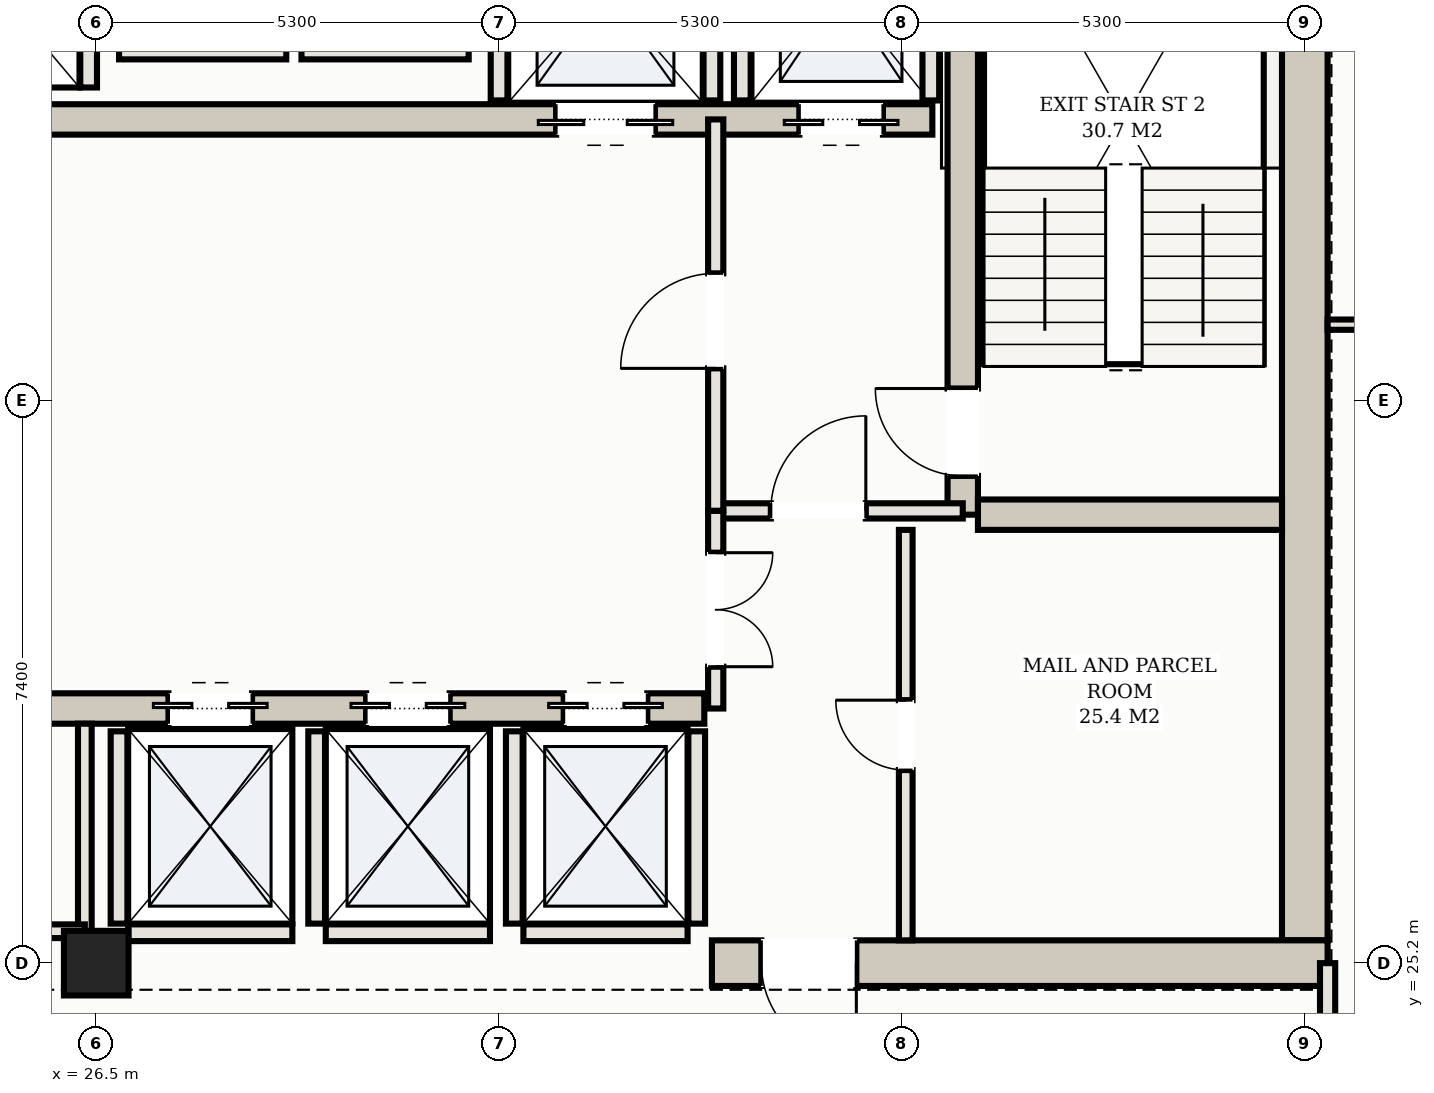
"""IFC4 building model, lengths in metres.
Left out: names, types, materials, properties, quantities, classifications, styles, units other than length and angle.
Written with IfcOpenShell. Run it as: python <this file> out.ifc"""

import sys

from ifc_helpers import new_model, si_unit, direction, frame, frame_2d, origin, origin_2d, place, context, subcontext, project, spatial, rectangle, hollow_rectangle, extrude, element, fill, save


model = new_model("IFC4")
c1 = context("Model", 3, precision=1e-05, world=origin(), true_north=direction((0.0, 1.0)))
c2 = subcontext(c1, "Body", "Model", "MODEL_VIEW")
j1 = project(units=[si_unit("LENGTHUNIT", "METRE"), si_unit("PLANEANGLEUNIT", "RADIAN")], contexts=[c1])
p1 = place(None, origin())
s1 = spatial("IfcSite", under=j1, at=p1, CompositionType="ELEMENT")
p2 = place(p1, origin())
s2 = spatial("IfcBuilding", under=s1, at=p2, CompositionType="ELEMENT")
p3 = place(p2, frame((0.0, 0.0, 175.5)))
s3 = spatial("IfcBuildingStorey", under=s2, at=p3, CompositionType="ELEMENT", Elevation=175.5)
p4 = place(p3, frame((42.4, 25.5, 0.0), z_axis=(0.0, 0.0, 1.0), x_axis=(0.0, 1.0, 0.0)))
e1 = element("IfcWall", 1, at=p4, inside=s3, PredefinedType="SHEAR", context=c2, shape_type="SweptSolid", body=[
    extrude(rectangle(XDim=14.2, YDim=0.6, at=frame_2d((7.1, 0.0))), origin(), (0.0, 0.0, 1.0), 3.1),
])
p5 = place(p3, frame((34.6, 25.2, 0.0), z_axis=(0.0, 0.0, 1.0), x_axis=(1.0, 0.0, 0.0)))
e2 = element("IfcWall", 2, at=p5, inside=s3, PredefinedType="SHEAR", context=c2, shape_type="SweptSolid", body=[
    extrude(rectangle(XDim=8.1, YDim=0.6, at=frame_2d((4.05, 0.0))), origin(), (0.0, 0.0, 1.0), 3.1),
])
p6 = place(p5, frame((0.65, 0.0, 0.0)))
e3 = element("IfcOpeningElement", 3, at=p6, cuts=e2, PredefinedType="OPENING", context=c2, shape_type="SweptSolid", body=[
    extrude(rectangle(XDim=1.25, YDim=2.2, at=frame_2d((0.625, 1.1))), frame((0.0, 0.31, 0.0), z_axis=(0.0, -1.0, 0.0), x_axis=(1.0, 0.0, 0.0)), (0.0, 0.0, 1.0), 0.62),
])
p7 = place(p3, frame((37.9, 31.1, 0.0), z_axis=(0.0, 0.0, 1.0), x_axis=(0.0, 1.0, 0.0)))
e4 = element("IfcWall", 4, at=p7, inside=s3, PredefinedType="SHEAR", context=c2, shape_type="SweptSolid", body=[
    extrude(rectangle(XDim=8.6, YDim=0.4, at=frame_2d((4.3, 0.0))), origin(), (0.0, 0.0, 1.0), 3.1),
])
p8 = place(p7, frame((0.51, 0.0, 0.0)))
e5 = element("IfcOpeningElement", 5, at=p8, cuts=e4, PredefinedType="OPENING", context=c2, shape_type="SweptSolid", body=[
    extrude(rectangle(XDim=1.15, YDim=2.2, at=frame_2d((0.575, 1.1))), frame((0.0, 0.21, 0.0), z_axis=(0.0, -1.0, 0.0), x_axis=(1.0, 0.0, 0.0)), (0.0, 0.0, 1.0), 0.42),
])
p9 = place(p3, frame((38.1, 31.1, 0.0), z_axis=(0.0, 0.0, 1.0), x_axis=(1.0, 0.0, 0.0)))
e6 = element("IfcWall", 6, at=p9, inside=s3, PredefinedType="SHEAR", context=c2, shape_type="SweptSolid", body=[
    extrude(rectangle(XDim=4.0, YDim=0.4, at=frame_2d((2.0, 0.0))), origin(), (0.0, 0.0, 1.0), 3.1),
])
p10 = place(p3, frame((15.5, 36.3, 0.0), z_axis=(0.0, 0.0, 1.0), x_axis=(1.0, 0.0, 0.0)))
e7 = element("IfcWall", 7, at=p10, inside=s3, PredefinedType="SHEAR", context=c2, shape_type="SweptSolid", body=[
    extrude(rectangle(XDim=22.0, YDim=0.4, at=frame_2d((11.0, 0.0))), origin(), (0.0, 0.0, 1.0), 3.1),
])
p11 = place(p10, frame((0.65, 0.0, 0.0)))
e8 = element("IfcOpeningElement", 8, at=p11, cuts=e7, PredefinedType="OPENING", context=c2, shape_type="SweptSolid", body=[
    extrude(rectangle(XDim=1.1, YDim=2.15, at=frame_2d((0.55, 1.075))), frame((0.0, 0.21, 0.0), z_axis=(0.0, -1.0, 0.0), x_axis=(1.0, 0.0, 0.0)), (0.0, 0.0, 1.0), 0.42),
])
p12 = place(p10, frame((20.25, 0.0, 0.0)))
e9 = element("IfcOpeningElement", 9, at=p12, cuts=e7, PredefinedType="OPENING", context=c2, shape_type="SweptSolid", body=[
    extrude(rectangle(XDim=1.1, YDim=2.15, at=frame_2d((0.55, 1.075))), frame((0.0, 0.21, 0.0), z_axis=(0.0, -1.0, 0.0), x_axis=(1.0, 0.0, 0.0)), (0.0, 0.0, 1.0), 0.42),
])
p13 = place(p10, frame((17.05, 0.0, 0.0)))
e10 = element("IfcOpeningElement", 10, at=p13, cuts=e7, PredefinedType="OPENING", context=c2, shape_type="SweptSolid", body=[
    extrude(rectangle(XDim=1.3, YDim=2.2, at=frame_2d((0.65, 1.1))), frame((0.0, 0.21, 0.0), z_axis=(0.0, -1.0, 0.0), x_axis=(1.0, 0.0, 0.0)), (0.0, 0.0, 1.0), 0.42),
])
p14 = place(p3, frame((18.5, 28.55, 0.0), z_axis=(0.0, 0.0, 1.0), x_axis=(1.0, 0.0, 0.0)))
e11 = element("IfcWall", 11, at=p14, inside=s3, PredefinedType="SHEAR", context=c2, shape_type="SweptSolid", body=[
    extrude(rectangle(XDim=16.0, YDim=0.4, at=frame_2d((8.0, 0.0))), origin(), (0.0, 0.0, 1.0), 3.1),
])
p15 = place(p14, frame((8.95, 0.0, 0.0)))
e12 = element("IfcOpeningElement", 12, at=p15, cuts=e11, PredefinedType="OPENING", context=c2, shape_type="SweptSolid", body=[
    extrude(rectangle(XDim=1.1, YDim=2.15, at=frame_2d((0.55, 1.075))), frame((0.0, 0.21, 0.0), z_axis=(0.0, -1.0, 0.0), x_axis=(1.0, 0.0, 0.0)), (0.0, 0.0, 1.0), 0.42),
])
p16 = place(p14, frame((11.55, 0.0, 0.0)))
e13 = element("IfcOpeningElement", 13, at=p16, cuts=e11, PredefinedType="OPENING", context=c2, shape_type="SweptSolid", body=[
    extrude(rectangle(XDim=1.1, YDim=2.15, at=frame_2d((0.55, 1.075))), frame((0.0, 0.21, 0.0), z_axis=(0.0, -1.0, 0.0), x_axis=(1.0, 0.0, 0.0)), (0.0, 0.0, 1.0), 0.42),
])
p17 = place(p14, frame((14.15, 0.0, 0.0)))
e14 = element("IfcOpeningElement", 14, at=p17, cuts=e11, PredefinedType="OPENING", context=c2, shape_type="SweptSolid", body=[
    extrude(rectangle(XDim=1.1, YDim=2.15, at=frame_2d((0.55, 1.075))), frame((0.0, 0.21, 0.0), z_axis=(0.0, -1.0, 0.0), x_axis=(1.0, 0.0, 0.0)), (0.0, 0.0, 1.0), 0.42),
])
p18 = place(p3, frame((26.5, 25.2, 0.0), z_axis=(0.0, 0.0, 1.0), x_axis=(1.0, 0.0, 0.0)))
e15 = element("IfcColumn", 15, at=p18, inside=s3, PredefinedType="COLUMN", context=c2, shape_type="SweptSolid", body=[
    extrude(hollow_rectangle(XDim=0.85, YDim=0.85, WallThickness=0.028, at=origin_2d()), origin(), (0.0, 0.0, 1.0), 3.3),
])
for number, where, z_axis, x_axis in (
    (16, (35.0, 36.55, 0.0), (0.0, 0.0, 1.0), (0.0, 1.0, 0.0)),
    (17, (37.48, 36.55, 0.0), (0.0, 0.0, 1.0), (0.0, 1.0, 0.0)),
    (18, (31.8, 36.55, 0.0), (0.0, 0.0, 1.0), (0.0, 1.0, 0.0)),
    (19, (34.6, 36.55, 0.0), (0.0, 0.0, 1.0), (0.0, 1.0, 0.0)),
):
    element("IfcWall", number, at=place(p3, frame(where, z_axis=z_axis, x_axis=x_axis)), inside=s3, PredefinedType="SOLIDWALL", context=c2, shape_type="SweptSolid", body=[
        extrude(rectangle(XDim=2.93, YDim=0.22, at=frame_2d((1.465, 0.0))), origin(), (0.0, 0.0, 1.0), 3.1),
    ])
p19 = place(p3, frame((26.8, 25.72, 0.0), z_axis=(0.0, 0.0, 1.0), x_axis=(0.0, 1.0, 0.0)))
e20 = element("IfcWall", 20, at=p19, inside=s3, PredefinedType="SOLIDWALL", context=c2, shape_type="SweptSolid", body=[
    extrude(rectangle(XDim=2.53, YDim=0.22, at=frame_2d((1.265, 0.0))), origin(), (0.0, 0.0, 1.0), 3.1),
])
p20 = place(p3, frame((26.92, 25.6, 0.0), z_axis=(0.0, 0.0, 1.0), x_axis=(1.0, 0.0, 0.0)))
e21 = element("IfcWall", 21, at=p20, inside=s3, PredefinedType="SOLIDWALL", context=c2, shape_type="SweptSolid", body=[
    extrude(rectangle(XDim=2.16, YDim=0.22, at=frame_2d((1.08, 0.0))), origin(), (0.0, 0.0, 1.0), 2.295),
])
p21 = place(p3, frame((29.4, 25.72, 0.0), z_axis=(0.0, 0.0, 1.0), x_axis=(0.0, 1.0, 0.0)))
e22 = element("IfcWall", 22, at=p21, inside=s3, PredefinedType="SOLIDWALL", context=c2, shape_type="SweptSolid", body=[
    extrude(rectangle(XDim=2.53, YDim=0.22, at=frame_2d((1.265, 0.0))), origin(), (0.0, 0.0, 1.0), 3.1),
])
p22 = place(p3, frame((29.52, 25.6, 0.0), z_axis=(0.0, 0.0, 1.0), x_axis=(1.0, 0.0, 0.0)))
e23 = element("IfcWall", 23, at=p22, inside=s3, PredefinedType="SOLIDWALL", context=c2, shape_type="SweptSolid", body=[
    extrude(rectangle(XDim=2.16, YDim=0.22, at=frame_2d((1.08, 0.0))), origin(), (0.0, 0.0, 1.0), 2.295),
])
for number, where, z_axis, x_axis in (
    (24, (32.0, 25.72, 0.0), (0.0, 0.0, 1.0), (0.0, 1.0, 0.0)),
    (25, (34.4, 25.72, 0.0), (0.0, 0.0, 1.0), (0.0, 1.0, 0.0)),
):
    element("IfcWall", number, at=place(p3, frame(where, z_axis=z_axis, x_axis=x_axis)), inside=s3, PredefinedType="SOLIDWALL", context=c2, shape_type="SweptSolid", body=[
        extrude(rectangle(XDim=2.53, YDim=0.22, at=frame_2d((1.265, 0.0))), origin(), (0.0, 0.0, 1.0), 3.1),
    ])
p23 = place(p3, frame((32.12, 25.6, 0.0), z_axis=(0.0, 0.0, 1.0), x_axis=(1.0, 0.0, 0.0)))
e26 = element("IfcWall", 26, at=p23, inside=s3, PredefinedType="SOLIDWALL", context=c2, shape_type="SweptSolid", body=[
    extrude(rectangle(XDim=2.16, YDim=0.22, at=frame_2d((1.08, 0.0))), origin(), (0.0, 0.0, 1.0), 2.295),
])
p24 = place(p3, frame((26.4, 36.72, 0.0), z_axis=(0.0, 0.0, 1.0), x_axis=(0.0, 1.0, 0.0)))
e27 = element("IfcWall", 27, at=p24, inside=s3, PredefinedType="SOLIDWALL", context=c2, shape_type="SweptSolid", body=[
    extrude(rectangle(XDim=2.56, YDim=0.22, at=frame_2d((1.28, 0.0))), origin(), (0.0, 0.0, 1.0), 3.1),
])
for number, where, z_axis, x_axis in (
    (28, (26.8, 37.2, 0.0), (0.0, 0.0, 1.0), (1.0, 0.0, 0.0)),
    (29, (29.2, 37.2, 0.0), (0.0, 0.0, 1.0), (1.0, 0.0, 0.0)),
):
    element("IfcWall", number, at=place(p3, frame(where, z_axis=z_axis, x_axis=x_axis)), inside=s3, PredefinedType="SOLIDWALL", context=c2, shape_type="SweptSolid", body=[
        extrude(rectangle(XDim=2.2, YDim=0.22, at=frame_2d((1.1, 0.0))), origin(), (0.0, 0.0, 1.0), 3.1),
    ])
p25 = place(p3, frame((34.65, 31.15, 0.0), z_axis=(0.0, 0.0, 1.0), x_axis=(1.0, 0.0, 0.0)))
e30 = element("IfcWall", 30, at=p25, inside=s3, PredefinedType="PARTITIONING", context=c2, shape_type="SweptSolid", body=[
    extrude(rectangle(XDim=3.25, YDim=0.2, at=frame_2d((1.625, 0.0))), origin(), (0.0, 0.0, 1.0), 2.38),
])
p26 = place(p25, frame((0.725, 0.0, 0.0)))
e31 = element("IfcOpeningElement", 31, at=p26, cuts=e30, PredefinedType="OPENING", context=c2, shape_type="SweptSolid", body=[
    extrude(rectangle(XDim=1.25, YDim=2.2, at=frame_2d((0.625, 1.1))), frame((0.0, 0.11, 0.0), z_axis=(0.0, -1.0, 0.0), x_axis=(1.0, 0.0, 0.0)), (0.0, 0.0, 1.0), 0.22),
])
p27 = place(p3, frame((34.65, 31.15, 0.0), z_axis=(0.0, 0.0, 1.0), x_axis=(0.0, 1.0, 0.0)))
e32 = element("IfcWall", 32, at=p27, inside=s3, PredefinedType="PARTITIONING", context=c2, shape_type="SweptSolid", body=[
    extrude(rectangle(XDim=5.15, YDim=0.2, at=frame_2d((2.575, 0.0))), origin(), (0.0, 0.0, 1.0), 2.38),
])
p28 = place(p27, frame((1.875, 0.0, 0.0)))
e33 = element("IfcOpeningElement", 33, at=p28, cuts=e32, PredefinedType="OPENING", context=c2, shape_type="SweptSolid", body=[
    extrude(rectangle(XDim=1.25, YDim=2.2, at=frame_2d((0.625, 1.1))), frame((0.0, 0.11, 0.0), z_axis=(0.0, -1.0, 0.0), x_axis=(1.0, 0.0, 0.0)), (0.0, 0.0, 1.0), 0.22),
])
p29 = place(p3, frame((37.15, 25.5, 0.0), z_axis=(0.0, 0.0, 1.0), x_axis=(0.0, 1.0, 0.0)))
e34 = element("IfcWall", 34, at=p29, inside=s3, PredefinedType="PARTITIONING", context=c2, shape_type="SweptSolid", body=[
    extrude(rectangle(XDim=5.4, YDim=0.18, at=frame_2d((2.7, 0.0))), origin(), (0.0, 0.0, 1.0), 2.38),
])
p30 = place(p29, frame((2.24, 0.0, 0.0)))
e35 = element("IfcOpeningElement", 35, at=p30, cuts=e34, PredefinedType="OPENING", context=c2, shape_type="SweptSolid", body=[
    extrude(rectangle(XDim=0.92, YDim=2.15, at=frame_2d((0.46, 1.075))), frame((0.0, 0.1, 0.0), z_axis=(0.0, -1.0, 0.0), x_axis=(1.0, 0.0, 0.0)), (0.0, 0.0, 1.0), 0.2),
])
p31 = place(p3, frame((34.65, 28.55, 0.0), z_axis=(0.0, 0.0, 1.0), x_axis=(0.0, 1.0, 0.0)))
e36 = element("IfcWall", 36, at=p31, inside=s3, PredefinedType="PARTITIONING", context=c2, shape_type="SweptSolid", body=[
    extrude(rectangle(XDim=2.6, YDim=0.2, at=frame_2d((1.3, 0.0))), origin(), (0.0, 0.0, 1.0), 2.38),
])
p32 = place(p31, frame((0.55, 0.0, 0.0)))
e37 = element("IfcOpeningElement", 37, at=p32, cuts=e36, PredefinedType="OPENING", context=c2, shape_type="SweptSolid", body=[
    extrude(rectangle(XDim=1.5, YDim=2.25, at=frame_2d((0.75, 1.125))), frame((0.0, 0.11, 0.0), z_axis=(0.0, -1.0, 0.0), x_axis=(1.0, 0.0, 0.0)), (0.0, 0.0, 1.0), 0.22),
])
p33 = place(p3, frame((26.35, 25.62, 0.0), z_axis=(0.0, 0.0, 1.0), x_axis=(0.0, 1.0, 0.0)))
e38 = element("IfcWall", 38, at=p33, inside=s3, PredefinedType="PARTITIONING", context=c2, shape_type="SweptSolid", body=[
    extrude(rectangle(XDim=2.73, YDim=0.18, at=frame_2d((1.365, 0.0))), origin(), (0.0, 0.0, 1.0), 2.38),
])
p34 = place(p3, frame((18.45, 25.62, 0.0), z_axis=(0.0, 0.0, 1.0), x_axis=(1.0, 0.0, 0.0)))
e39 = element("IfcWall", 39, at=p34, inside=s3, PredefinedType="PARTITIONING", context=c2, shape_type="SweptSolid", body=[
    extrude(rectangle(XDim=7.9, YDim=0.18, at=frame_2d((3.95, 0.0))), origin(), (0.0, 0.0, 1.0), 2.38),
])
p35 = place(p34, frame((3.34, 0.0, 0.0)))
e40 = element("IfcOpeningElement", 40, at=p35, cuts=e39, PredefinedType="OPENING", context=c2, shape_type="SweptSolid", body=[
    extrude(rectangle(XDim=0.92, YDim=2.15, at=frame_2d((0.46, 1.075))), frame((0.0, 0.1, 0.0), z_axis=(0.0, -1.0, 0.0), x_axis=(1.0, 0.0, 0.0)), (0.0, 0.0, 1.0), 0.2),
])
p36 = place(p3, frame((42.7, 23.3, 0.0), z_axis=(0.0, 0.0, 1.0), x_axis=(0.0, 1.0, 0.0)))
e41 = element("IfcWall", 41, at=p36, inside=s3, PredefinedType="PARTITIONING", context=c2, shape_type="SweptSolid", body=[
    extrude(rectangle(XDim=1.9, YDim=0.2, at=frame_2d((0.95, 0.0))), origin(), (0.0, 0.0, 1.0), 2.38),
])
p37 = place(p3, frame((42.7, 33.6, 0.0), z_axis=(0.0, 0.0, 1.0), x_axis=(1.0, 0.0, 0.0)))
e42 = element("IfcWall", 42, at=p37, inside=s3, PredefinedType="PARTITIONING", context=c2, shape_type="SweptSolid", body=[
    extrude(rectangle(XDim=5.98, YDim=0.135, at=frame_2d((2.99, 0.0))), origin(), (0.0, 0.0, 1.0), 2.38),
])
p38 = place(p37, frame((2.53, 0.0, 0.0)))
e43 = element("IfcOpeningElement", 43, at=p38, cuts=e42, PredefinedType="OPENING", context=c2, shape_type="SweptSolid", body=[
    extrude(rectangle(XDim=0.92, YDim=2.15, at=frame_2d((0.46, 1.075))), frame((0.0, 0.078, 0.0), z_axis=(0.0, -1.0, 0.0), x_axis=(1.0, 0.0, 0.0)), (0.0, 0.0, 1.0), 0.155),
])
p39 = place(p12, frame((1.1, 0.0, 0.0), z_axis=(0.0, 0.0, 1.0), x_axis=(-1.0, 0.0, 0.0)))
e44 = element("IfcDoor", 44, at=p39, inside=s3, OperationType="DOUBLE_DOOR_SLIDING", PredefinedType="DOOR", context=c2, shape_type="SweptSolid", body=[
    extrude(rectangle(XDim=1.1, YDim=2.15, at=frame_2d((0.55, 1.075))), frame((0.0, 0.025, 0.0), z_axis=(0.0, -1.0, 0.0), x_axis=(1.0, 0.0, 0.0)), (0.0, 0.0, 1.0), 0.05),
])
fill(e9, e44)
p40 = place(p13, frame((1.3, 0.0, 0.0), z_axis=(0.0, 0.0, 1.0), x_axis=(-1.0, 0.0, 0.0)))
e45 = element("IfcDoor", 45, at=p40, inside=s3, OperationType="DOUBLE_DOOR_SLIDING", PredefinedType="DOOR", context=c2, shape_type="SweptSolid", body=[
    extrude(rectangle(XDim=1.3, YDim=2.2, at=frame_2d((0.65, 1.1))), frame((0.0, 0.025, 0.0), z_axis=(0.0, -1.0, 0.0), x_axis=(1.0, 0.0, 0.0)), (0.0, 0.0, 1.0), 0.05),
])
fill(e10, e45)
p41 = place(p15, origin())
e46 = element("IfcDoor", 46, at=p41, inside=s3, OperationType="DOUBLE_DOOR_SLIDING", PredefinedType="DOOR", context=c2, shape_type="SweptSolid", body=[
    extrude(rectangle(XDim=1.1, YDim=2.15, at=frame_2d((0.55, 1.075))), frame((0.0, 0.025, 0.0), z_axis=(0.0, -1.0, 0.0), x_axis=(1.0, 0.0, 0.0)), (0.0, 0.0, 1.0), 0.05),
])
fill(e12, e46)
p42 = place(p16, origin())
e47 = element("IfcDoor", 47, at=p42, inside=s3, OperationType="DOUBLE_DOOR_SLIDING", PredefinedType="DOOR", context=c2, shape_type="SweptSolid", body=[
    extrude(rectangle(XDim=1.1, YDim=2.15, at=frame_2d((0.55, 1.075))), frame((0.0, 0.025, 0.0), z_axis=(0.0, -1.0, 0.0), x_axis=(1.0, 0.0, 0.0)), (0.0, 0.0, 1.0), 0.05),
])
fill(e13, e47)
p43 = place(p17, origin())
e48 = element("IfcDoor", 48, at=p43, inside=s3, OperationType="DOUBLE_DOOR_SLIDING", PredefinedType="DOOR", context=c2, shape_type="SweptSolid", body=[
    extrude(rectangle(XDim=1.1, YDim=2.15, at=frame_2d((0.55, 1.075))), frame((0.0, 0.025, 0.0), z_axis=(0.0, -1.0, 0.0), x_axis=(1.0, 0.0, 0.0)), (0.0, 0.0, 1.0), 0.05),
])
fill(e14, e48)
p44 = place(p6, frame((1.25, 0.0, 0.0), z_axis=(0.0, 0.0, 1.0), x_axis=(-1.0, 0.0, 0.0)))
e49 = element("IfcDoor", 49, at=p44, inside=s3, OperationType="SINGLE_SWING_LEFT", PredefinedType="DOOR", context=c2, shape_type="SweptSolid", body=[
    extrude(rectangle(XDim=1.25, YDim=2.2, at=frame_2d((0.625, 1.1))), frame((0.0, 0.025, 0.0), z_axis=(0.0, -1.0, 0.0), x_axis=(1.0, 0.0, 0.0)), (0.0, 0.0, 1.0), 0.05),
])
fill(e3, e49)
p45 = place(p26, origin())
e50 = element("IfcDoor", 50, at=p45, inside=s3, OperationType="SINGLE_SWING_RIGHT", PredefinedType="DOOR", context=c2, shape_type="SweptSolid", body=[
    extrude(rectangle(XDim=1.25, YDim=2.2, at=frame_2d((0.625, 1.1))), frame((0.0, 0.025, 0.0), z_axis=(0.0, -1.0, 0.0), x_axis=(1.0, 0.0, 0.0)), (0.0, 0.0, 1.0), 0.05),
])
fill(e31, e50)
p46 = place(p28, origin())
e51 = element("IfcDoor", 51, at=p46, inside=s3, OperationType="SINGLE_SWING_LEFT", PredefinedType="DOOR", context=c2, shape_type="SweptSolid", body=[
    extrude(rectangle(XDim=1.25, YDim=2.2, at=frame_2d((0.625, 1.1))), frame((0.0, 0.025, 0.0), z_axis=(0.0, -1.0, 0.0), x_axis=(1.0, 0.0, 0.0)), (0.0, 0.0, 1.0), 0.05),
])
fill(e33, e51)
p47 = place(p8, origin())
e52 = element("IfcDoor", 52, at=p47, inside=s3, OperationType="SINGLE_SWING_RIGHT", PredefinedType="DOOR", context=c2, shape_type="SweptSolid", body=[
    extrude(rectangle(XDim=1.15, YDim=2.2, at=frame_2d((0.575, 1.1))), frame((0.0, 0.025, 0.0), z_axis=(0.0, -1.0, 0.0), x_axis=(1.0, 0.0, 0.0)), (0.0, 0.0, 1.0), 0.05),
])
fill(e5, e52)
p48 = place(p30, origin())
e53 = element("IfcDoor", 53, at=p48, inside=s3, OperationType="SINGLE_SWING_RIGHT", PredefinedType="DOOR", context=c2, shape_type="SweptSolid", body=[
    extrude(rectangle(XDim=0.92, YDim=2.15, at=frame_2d((0.46, 1.075))), frame((0.0, 0.025, 0.0), z_axis=(0.0, -1.0, 0.0), x_axis=(1.0, 0.0, 0.0)), (0.0, 0.0, 1.0), 0.05),
])
fill(e35, e53)
p49 = place(p32, frame((1.5, 0.0, 0.0), z_axis=(0.0, 0.0, 1.0), x_axis=(-1.0, 0.0, 0.0)))
e54 = element("IfcDoor", 54, at=p49, inside=s3, OperationType="DOUBLE_DOOR_SINGLE_SWING", PredefinedType="DOOR", context=c2, shape_type="SweptSolid", body=[
    extrude(rectangle(XDim=1.5, YDim=2.25, at=frame_2d((0.75, 1.125))), frame((0.0, 0.025, 0.0), z_axis=(0.0, -1.0, 0.0), x_axis=(1.0, 0.0, 0.0)), (0.0, 0.0, 1.0), 0.05),
])
fill(e37, e54)
save(model, sys.argv[1])
